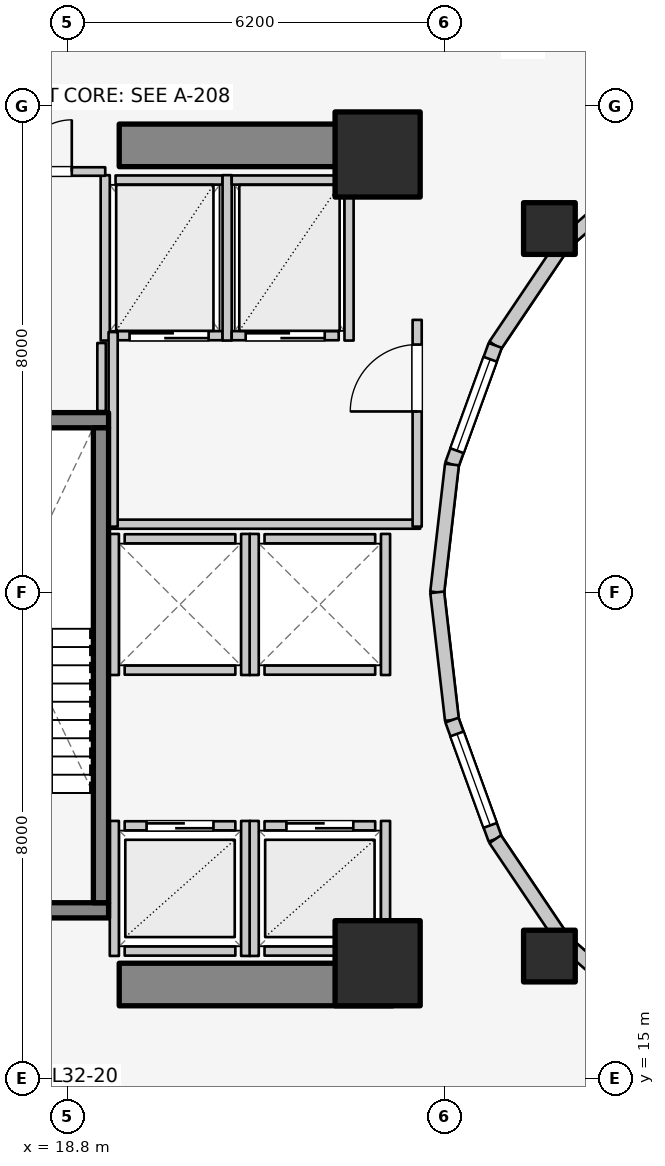
"""IFC4 building model, lengths in metres.
Left out: names, types, materials, properties, quantities, classifications, styles, units other than length and angle.
Written with IfcOpenShell. Run it as: python <this file> out.ifc"""

import sys

from ifc_helpers import new_model, si_unit, direction, frame, frame_2d, origin, origin_2d, place, context, subcontext, project, spatial, rectangle, extrude, element, fill, save


model = new_model("IFC4")
c1 = context("Model", 3, precision=1e-05, world=origin(), true_north=direction((0.0, 1.0)))
c2 = subcontext(c1, "Body", "Model", "MODEL_VIEW")
j1 = project(units=[si_unit("LENGTHUNIT", "METRE"), si_unit("PLANEANGLEUNIT", "RADIAN")], contexts=[c1])
p1 = place(None, origin())
s1 = spatial("IfcSite", under=j1, at=p1, CompositionType="ELEMENT")
p2 = place(p1, origin())
s2 = spatial("IfcBuilding", under=s1, at=p2, CompositionType="ELEMENT")
p3 = place(p2, frame((0.0, 0.0, 107.3)))
s3 = spatial("IfcBuildingStorey", under=s2, at=p3, CompositionType="ELEMENT", Elevation=107.3)
for number, where, z_axis, x_axis in (
    (1, (19.65, 16.55, 0.0), (0.0, 0.0, 1.0), (1.0, 0.0, 0.0)),
    (2, (19.65, 30.35, 0.0), (0.0, 0.0, 1.0), (1.0, 0.0, 0.0)),
):
    element("IfcWall", number, at=place(p3, frame(where, z_axis=z_axis, x_axis=x_axis)), inside=s3, PredefinedType="SHEAR", context=c2, shape_type="SweptSolid", body=[
        extrude(rectangle(XDim=4.5, YDim=0.7, at=frame_2d((2.25, 0.0))), origin(), (0.0, 0.0, 1.0), 3.1),
    ])
p4 = place(p3, frame((16.105, 17.77, 0.0), z_axis=(0.0, 0.0, 1.0), x_axis=(1.0, 0.0, 0.0)))
e3 = element("IfcWall", 3, at=p4, inside=s3, PredefinedType="SOLIDWALL", context=c2, shape_type="SweptSolid", body=[
    extrude(rectangle(XDim=3.37, YDim=0.25, at=frame_2d((1.685, 0.0))), origin(), (0.0, 0.0, 1.0), 3.1),
])
p5 = place(p4, frame((1.135, 0.0, 0.0)))
e4 = element("IfcOpeningElement", 4, at=p5, cuts=e3, PredefinedType="OPENING", context=c2, shape_type="SweptSolid", body=[
    extrude(rectangle(XDim=1.1, YDim=2.1, at=frame_2d((0.55, 1.05))), frame((0.0, 0.135, 0.0), z_axis=(0.0, -1.0, 0.0), x_axis=(1.0, 0.0, 0.0)), (0.0, 0.0, 1.0), 0.27),
])
p6 = place(p3, frame((16.105, 25.83, 0.0), z_axis=(0.0, 0.0, 1.0), x_axis=(1.0, 0.0, 0.0)))
e5 = element("IfcWall", 5, at=p6, inside=s3, PredefinedType="SOLIDWALL", context=c2, shape_type="SweptSolid", body=[
    extrude(rectangle(XDim=3.37, YDim=0.25, at=frame_2d((1.685, 0.0))), origin(), (0.0, 0.0, 1.0), 3.1),
])
p7 = place(p3, frame((19.35, 17.895, 0.0), z_axis=(0.0, 0.0, 1.0), x_axis=(0.0, 1.0, 0.0)))
e6 = element("IfcWall", 6, at=p7, inside=s3, PredefinedType="SOLIDWALL", context=c2, shape_type="SweptSolid", body=[
    extrude(rectangle(XDim=7.81, YDim=0.25, at=frame_2d((3.905, 0.0))), origin(), (0.0, 0.0, 1.0), 3.1),
])
for number, where, z_axis, x_axis in (
    (7, (23.9, 16.9, 0.0), (0.0, 0.0, 1.0), (1.0, 0.0, 0.0)),
    (8, (23.9, 30.2, 0.0), (0.0, 0.0, 1.0), (1.0, 0.0, 0.0)),
):
    element("IfcColumn", number, at=place(p3, frame(where, z_axis=z_axis, x_axis=x_axis)), inside=s3, PredefinedType="COLUMN", context=c2, shape_type="SweptSolid", body=[
        extrude(rectangle(XDim=1.4, YDim=1.4, at=origin_2d()), origin(), (0.0, 0.0, 1.0), 3.1),
    ])
for number, where, z_axis, x_axis in (
    (9, (26.725, 28.982, 0.0), (0.0, 0.0, 1.0), (1.0, 0.0, 0.0)),
    (10, (26.725, 17.018, 0.0), (0.0, 0.0, 1.0), (1.0, 0.0, 0.0)),
):
    element("IfcColumn", number, at=place(p3, frame(where, z_axis=z_axis, x_axis=x_axis)), inside=s3, PredefinedType="COLUMN", context=c2, shape_type="SweptSolid", body=[
        extrude(rectangle(XDim=0.85, YDim=0.85, at=origin_2d()), origin(), (0.0, 0.0, 1.0), 3.1),
    ])
p8 = place(p3, frame((28.44, 30.032, 0.0), z_axis=(0.0, 0.0, 1.0), x_axis=(-0.752576694707, -0.658504607869, 0.0)))
e11 = element("IfcWall", 11, at=p8, inside=s3, PredefinedType="STANDARD", context=c2, shape_type="SweptSolid", body=[
    extrude(rectangle(XDim=1.959, YDim=0.23, at=frame_2d((0.98, 0.0))), origin(), (0.0, 0.0, 1.0), 2.16),
])
p9 = place(p3, frame((26.965, 28.742, 0.0), z_axis=(0.0, 0.0, 1.0), x_axis=(-0.558197800898, -0.829707909492, 0.0)))
e12 = element("IfcWall", 12, at=p9, inside=s3, PredefinedType="STANDARD", context=c2, shape_type="SweptSolid", body=[
    extrude(rectangle(XDim=2.027, YDim=0.23, at=frame_2d((1.013, 0.0))), origin(), (0.0, 0.0, 1.0), 2.16),
])
p10 = place(p3, frame((25.834, 27.06, 0.0), z_axis=(0.0, 0.0, 1.0), x_axis=(-0.341423187295, -0.93990968033, 0.0)))
e13 = element("IfcWall", 13, at=p10, inside=s3, PredefinedType="STANDARD", context=c2, shape_type="SweptSolid", body=[
    extrude(rectangle(XDim=2.084, YDim=0.23, at=frame_2d((1.042, 0.0))), origin(), (0.0, 0.0, 1.0), 2.84),
])
p11 = place(p10, frame((0.242, 0.0, 0.85)))
e14 = element("IfcOpeningElement", 14, at=p11, cuts=e13, PredefinedType="OPENING", context=c2, shape_type="SweptSolid", body=[
    extrude(rectangle(XDim=1.6, YDim=1.65, at=frame_2d((0.8, 0.825))), frame((0.0, 0.125, 0.0), z_axis=(0.0, -1.0, 0.0), x_axis=(1.0, 0.0, 0.0)), (0.0, 0.0, 1.0), 0.25),
])
for number, where, z_axis, x_axis in (
    (15, (25.123, 25.102, 0.0), (0.0, 0.0, 1.0), (-0.115, -0.993, 0.0)),
    (16, (24.88, 23.0, 0.0), (0.0, 0.0, 1.0), (0.115, -0.993, 0.0)),
):
    element("IfcWall", number, at=place(p3, frame(where, z_axis=z_axis, x_axis=x_axis)), inside=s3, PredefinedType="STANDARD", context=c2, shape_type="SweptSolid", body=[
        extrude(rectangle(XDim=2.115, YDim=0.23, at=frame_2d((1.058, 0.0))), origin(), (0.0, 0.0, 1.0), 2.84),
    ])
p12 = place(p3, frame((25.123, 20.898, 0.0), z_axis=(0.0, 0.0, 1.0), x_axis=(0.341423187295, -0.93990968033, 0.0)))
e17 = element("IfcWall", 17, at=p12, inside=s3, PredefinedType="STANDARD", context=c2, shape_type="SweptSolid", body=[
    extrude(rectangle(XDim=2.084, YDim=0.23, at=frame_2d((1.042, 0.0))), origin(), (0.0, 0.0, 1.0), 2.84),
])
p13 = place(p12, frame((0.242, 0.0, 0.85)))
e18 = element("IfcOpeningElement", 18, at=p13, cuts=e17, PredefinedType="OPENING", context=c2, shape_type="SweptSolid", body=[
    extrude(rectangle(XDim=1.6, YDim=1.65, at=frame_2d((0.8, 0.825))), frame((0.0, 0.125, 0.0), z_axis=(0.0, -1.0, 0.0), x_axis=(1.0, 0.0, 0.0)), (0.0, 0.0, 1.0), 0.25),
])
p14 = place(p3, frame((25.834, 18.94, 0.0), z_axis=(0.0, 0.0, 1.0), x_axis=(0.558197800898, -0.829707909492, 0.0)))
e19 = element("IfcWall", 19, at=p14, inside=s3, PredefinedType="STANDARD", context=c2, shape_type="SweptSolid", body=[
    extrude(rectangle(XDim=2.027, YDim=0.23, at=frame_2d((1.013, 0.0))), origin(), (0.0, 0.0, 1.0), 2.16),
])
p15 = place(p3, frame((26.965, 17.258, 0.0), z_axis=(0.0, 0.0, 1.0), x_axis=(0.752576694707, -0.658504607869, 0.0)))
e20 = element("IfcWall", 20, at=p15, inside=s3, PredefinedType="STANDARD", context=c2, shape_type="SweptSolid", body=[
    extrude(rectangle(XDim=1.959, YDim=0.23, at=frame_2d((0.98, 0.0))), origin(), (0.0, 0.0, 1.0), 2.16),
])
p16 = place(p3, frame((19.74, 19.16, 0.0), z_axis=(0.0, 0.0, 1.0), x_axis=(1.0, 0.0, 0.0)))
e21 = element("IfcWall", 21, at=p16, inside=s3, PredefinedType="SOLIDWALL", context=c2, shape_type="SweptSolid", body=[
    extrude(rectangle(XDim=1.82, YDim=0.15, at=frame_2d((0.91, 0.0))), origin(), (0.0, 0.0, 1.0), 2.855),
])
p17 = place(p16, frame((0.36, 0.0, 0.0)))
e22 = element("IfcOpeningElement", 22, at=p17, cuts=e21, PredefinedType="OPENING", context=c2, shape_type="SweptSolid", body=[
    extrude(rectangle(XDim=1.1, YDim=2.1, at=frame_2d((0.55, 1.05))), frame((0.0, 0.085, 0.0), z_axis=(0.0, -1.0, 0.0), x_axis=(1.0, 0.0, 0.0)), (0.0, 0.0, 1.0), 0.17),
])
p18 = place(p3, frame((19.74, 17.1, 0.0), z_axis=(0.0, 0.0, 1.0), x_axis=(1.0, 0.0, 0.0)))
e23 = element("IfcWall", 23, at=p18, inside=s3, PredefinedType="SOLIDWALL", context=c2, shape_type="SweptSolid", body=[
    extrude(rectangle(XDim=1.82, YDim=0.15, at=frame_2d((0.91, 0.0))), origin(), (0.0, 0.0, 1.0), 2.855),
])
p19 = place(p3, frame((19.57, 17.02, 0.0), z_axis=(0.0, 0.0, 1.0), x_axis=(0.0, 1.0, 0.0)))
e24 = element("IfcWall", 24, at=p19, inside=s3, PredefinedType="SOLIDWALL", context=c2, shape_type="SweptSolid", body=[
    extrude(rectangle(XDim=2.22, YDim=0.15, at=frame_2d((1.11, 0.0))), origin(), (0.0, 0.0, 1.0), 2.12),
])
p20 = place(p3, frame((21.73, 17.02, 0.0), z_axis=(0.0, 0.0, 1.0), x_axis=(0.0, 1.0, 0.0)))
e25 = element("IfcWall", 25, at=p20, inside=s3, PredefinedType="SOLIDWALL", context=c2, shape_type="SweptSolid", body=[
    extrude(rectangle(XDim=2.22, YDim=0.15, at=frame_2d((1.11, 0.0))), origin(), (0.0, 0.0, 1.0), 2.855),
])
p21 = place(p3, frame((22.04, 19.16, 0.0), z_axis=(0.0, 0.0, 1.0), x_axis=(1.0, 0.0, 0.0)))
e26 = element("IfcWall", 26, at=p21, inside=s3, PredefinedType="SOLIDWALL", context=c2, shape_type="SweptSolid", body=[
    extrude(rectangle(XDim=1.82, YDim=0.15, at=frame_2d((0.91, 0.0))), origin(), (0.0, 0.0, 1.0), 2.12),
])
p22 = place(p21, frame((0.36, 0.0, 0.0)))
e27 = element("IfcOpeningElement", 27, at=p22, cuts=e26, PredefinedType="OPENING", context=c2, shape_type="SweptSolid", body=[
    extrude(rectangle(XDim=1.1, YDim=2.1, at=frame_2d((0.55, 1.05))), frame((0.0, 0.085, 0.0), z_axis=(0.0, -1.0, 0.0), x_axis=(1.0, 0.0, 0.0)), (0.0, 0.0, 1.0), 0.17),
])
p23 = place(p3, frame((22.04, 17.1, 0.0), z_axis=(0.0, 0.0, 1.0), x_axis=(1.0, 0.0, 0.0)))
e28 = element("IfcWall", 28, at=p23, inside=s3, PredefinedType="SOLIDWALL", context=c2, shape_type="SweptSolid", body=[
    extrude(rectangle(XDim=1.82, YDim=0.15, at=frame_2d((0.91, 0.0))), origin(), (0.0, 0.0, 1.0), 2.12),
])
p24 = place(p3, frame((21.87, 17.02, 0.0), z_axis=(0.0, 0.0, 1.0), x_axis=(0.0, 1.0, 0.0)))
e29 = element("IfcWall", 29, at=p24, inside=s3, PredefinedType="SOLIDWALL", context=c2, shape_type="SweptSolid", body=[
    extrude(rectangle(XDim=2.22, YDim=0.15, at=frame_2d((1.11, 0.0))), origin(), (0.0, 0.0, 1.0), 2.855),
])
p25 = place(p3, frame((24.03, 17.02, 0.0), z_axis=(0.0, 0.0, 1.0), x_axis=(0.0, 1.0, 0.0)))
e30 = element("IfcWall", 30, at=p25, inside=s3, PredefinedType="SOLIDWALL", context=c2, shape_type="SweptSolid", body=[
    extrude(rectangle(XDim=2.22, YDim=0.15, at=frame_2d((1.11, 0.0))), origin(), (0.0, 0.0, 1.0), 2.12),
])
for number, where, z_axis, x_axis in (
    (31, (19.74, 21.72, 0.0), (0.0, 0.0, 1.0), (1.0, 0.0, 0.0)),
    (32, (19.74, 23.88, 0.0), (0.0, 0.0, 1.0), (1.0, 0.0, 0.0)),
):
    element("IfcWall", number, at=place(p3, frame(where, z_axis=z_axis, x_axis=x_axis)), inside=s3, PredefinedType="SOLIDWALL", context=c2, shape_type="SweptSolid", body=[
        extrude(rectangle(XDim=1.82, YDim=0.15, at=frame_2d((0.91, 0.0))), origin(), (0.0, 0.0, 1.0), 2.855),
    ])
for number, where, z_axis, x_axis in (
    (33, (19.57, 21.64, 0.0), (0.0, 0.0, 1.0), (0.0, 1.0, 0.0)),
    (34, (21.73, 21.64, 0.0), (0.0, 0.0, 1.0), (0.0, 1.0, 0.0)),
):
    element("IfcWall", number, at=place(p3, frame(where, z_axis=z_axis, x_axis=x_axis)), inside=s3, PredefinedType="SOLIDWALL", context=c2, shape_type="SweptSolid", body=[
        extrude(rectangle(XDim=2.32, YDim=0.15, at=frame_2d((1.16, 0.0))), origin(), (0.0, 0.0, 1.0), 2.855),
    ])
for number, where, z_axis, x_axis in (
    (35, (22.04, 21.72, 0.0), (0.0, 0.0, 1.0), (1.0, 0.0, 0.0)),
    (36, (22.04, 23.88, 0.0), (0.0, 0.0, 1.0), (1.0, 0.0, 0.0)),
):
    element("IfcWall", number, at=place(p3, frame(where, z_axis=z_axis, x_axis=x_axis)), inside=s3, PredefinedType="SOLIDWALL", context=c2, shape_type="SweptSolid", body=[
        extrude(rectangle(XDim=1.82, YDim=0.15, at=frame_2d((0.91, 0.0))), origin(), (0.0, 0.0, 1.0), 2.12),
    ])
p26 = place(p3, frame((21.87, 21.64, 0.0), z_axis=(0.0, 0.0, 1.0), x_axis=(0.0, 1.0, 0.0)))
e37 = element("IfcWall", 37, at=p26, inside=s3, PredefinedType="SOLIDWALL", context=c2, shape_type="SweptSolid", body=[
    extrude(rectangle(XDim=2.32, YDim=0.15, at=frame_2d((1.16, 0.0))), origin(), (0.0, 0.0, 1.0), 2.855),
])
p27 = place(p3, frame((24.03, 21.64, 0.0), z_axis=(0.0, 0.0, 1.0), x_axis=(0.0, 1.0, 0.0)))
e38 = element("IfcWall", 38, at=p27, inside=s3, PredefinedType="SOLIDWALL", context=c2, shape_type="SweptSolid", body=[
    extrude(rectangle(XDim=2.32, YDim=0.15, at=frame_2d((1.16, 0.0))), origin(), (0.0, 0.0, 1.0), 2.12),
])
p28 = place(p3, frame((19.59, 27.22, 0.0), z_axis=(0.0, 0.0, 1.0), x_axis=(1.0, 0.0, 0.0)))
e39 = element("IfcWall", 39, at=p28, inside=s3, PredefinedType="SOLIDWALL", context=c2, shape_type="SweptSolid", body=[
    extrude(rectangle(XDim=1.76, YDim=0.15, at=frame_2d((0.88, 0.0))), origin(), (0.0, 0.0, 1.0), 2.855),
])
p29 = place(p28, frame((0.23, 0.0, 0.0)))
e40 = element("IfcOpeningElement", 40, at=p29, cuts=e39, PredefinedType="OPENING", context=c2, shape_type="SweptSolid", body=[
    extrude(rectangle(XDim=1.3, YDim=2.1, at=frame_2d((0.65, 1.05))), frame((0.0, 0.085, 0.0), z_axis=(0.0, -1.0, 0.0), x_axis=(1.0, 0.0, 0.0)), (0.0, 0.0, 1.0), 0.17),
])
p30 = place(p3, frame((19.59, 29.78, 0.0), z_axis=(0.0, 0.0, 1.0), x_axis=(1.0, 0.0, 0.0)))
e41 = element("IfcWall", 41, at=p30, inside=s3, PredefinedType="SOLIDWALL", context=c2, shape_type="SweptSolid", body=[
    extrude(rectangle(XDim=1.76, YDim=0.15, at=frame_2d((0.88, 0.0))), origin(), (0.0, 0.0, 1.0), 2.855),
])
for number, where, z_axis, x_axis in (
    (42, (19.42, 27.14, 0.0), (0.0, 0.0, 1.0), (0.0, 1.0, 0.0)),
    (43, (21.425, 27.14, 0.0), (0.0, 0.0, 1.0), (0.0, 1.0, 0.0)),
):
    element("IfcWall", number, at=place(p3, frame(where, z_axis=z_axis, x_axis=x_axis)), inside=s3, PredefinedType="SOLIDWALL", context=c2, shape_type="SweptSolid", body=[
        extrude(rectangle(XDim=2.72, YDim=0.15, at=frame_2d((1.36, 0.0))), origin(), (0.0, 0.0, 1.0), 2.855),
    ])
p31 = place(p3, frame((21.5, 27.22, 0.0), z_axis=(0.0, 0.0, 1.0), x_axis=(1.0, 0.0, 0.0)))
e44 = element("IfcWall", 44, at=p31, inside=s3, PredefinedType="SOLIDWALL", context=c2, shape_type="SweptSolid", body=[
    extrude(rectangle(XDim=1.76, YDim=0.15, at=frame_2d((0.88, 0.0))), origin(), (0.0, 0.0, 1.0), 2.855),
])
p32 = place(p31, frame((0.23, 0.0, 0.0)))
e45 = element("IfcOpeningElement", 45, at=p32, cuts=e44, PredefinedType="OPENING", context=c2, shape_type="SweptSolid", body=[
    extrude(rectangle(XDim=1.3, YDim=2.1, at=frame_2d((0.65, 1.05))), frame((0.0, 0.085, 0.0), z_axis=(0.0, -1.0, 0.0), x_axis=(1.0, 0.0, 0.0)), (0.0, 0.0, 1.0), 0.17),
])
p33 = place(p3, frame((21.5, 29.78, 0.0), z_axis=(0.0, 0.0, 1.0), x_axis=(1.0, 0.0, 0.0)))
e46 = element("IfcWall", 46, at=p33, inside=s3, PredefinedType="SOLIDWALL", context=c2, shape_type="SweptSolid", body=[
    extrude(rectangle(XDim=1.76, YDim=0.15, at=frame_2d((0.88, 0.0))), origin(), (0.0, 0.0, 1.0), 2.855),
])
p34 = place(p3, frame((23.43, 27.14, 0.0), z_axis=(0.0, 0.0, 1.0), x_axis=(0.0, 1.0, 0.0)))
e47 = element("IfcWall", 47, at=p34, inside=s3, PredefinedType="SOLIDWALL", context=c2, shape_type="SweptSolid", body=[
    extrude(rectangle(XDim=2.72, YDim=0.15, at=frame_2d((1.36, 0.0))), origin(), (0.0, 0.0, 1.0), 2.855),
])
p35 = place(p3, frame((19.52, 24.12, 0.0), z_axis=(0.0, 0.0, 1.0), x_axis=(1.0, 0.0, 0.0)))
e48 = element("IfcWall", 48, at=p35, inside=s3, PredefinedType="PARTITIONING", context=c2, shape_type="SweptSolid", body=[
    extrude(rectangle(XDim=5.08, YDim=0.15, at=frame_2d((2.54, 0.0))), origin(), (0.0, 0.0, 1.0), 2.12),
])
p36 = place(p3, frame((19.55, 24.08, 0.0), z_axis=(0.0, 0.0, 1.0), x_axis=(0.0, 1.0, 0.0)))
e49 = element("IfcWall", 49, at=p36, inside=s3, PredefinedType="PARTITIONING", context=c2, shape_type="SweptSolid", body=[
    extrude(rectangle(XDim=3.2, YDim=0.15, at=frame_2d((1.6, 0.0))), origin(), (0.0, 0.0, 1.0), 2.855),
])
p37 = place(p3, frame((24.55, 24.08, 0.0), z_axis=(0.0, 0.0, 1.0), x_axis=(0.0, 1.0, 0.0)))
e50 = element("IfcWall", 50, at=p37, inside=s3, PredefinedType="PARTITIONING", context=c2, shape_type="SweptSolid", body=[
    extrude(rectangle(XDim=3.4, YDim=0.15, at=frame_2d((1.7, 0.0))), origin(), (0.0, 0.0, 1.0), 2.855),
])
p38 = place(p37, frame((1.894, 0.0, 0.0)))
e51 = element("IfcOpeningElement", 51, at=p38, cuts=e50, PredefinedType="OPENING", context=c2, shape_type="SweptSolid", body=[
    extrude(rectangle(XDim=1.1, YDim=2.1, at=frame_2d((0.55, 1.05))), frame((0.0, 0.085, 0.0), z_axis=(0.0, -1.0, 0.0), x_axis=(1.0, 0.0, 0.0)), (0.0, 0.0, 1.0), 0.17),
])
p39 = place(p3, frame((17.52, 29.92, 0.0), z_axis=(0.0, 0.0, 1.0), x_axis=(1.0, 0.0, 0.0)))
e52 = element("IfcWall", 52, at=p39, inside=s3, PredefinedType="PLUMBINGWALL", context=c2, shape_type="SweptSolid", body=[
    extrude(rectangle(XDim=1.9, YDim=0.14, at=frame_2d((0.95, 0.0))), origin(), (0.0, 0.0, 1.0), 2.855),
])
p40 = place(p39, frame((0.5, 0.0, 0.0)))
e53 = element("IfcOpeningElement", 53, at=p40, cuts=e52, PredefinedType="OPENING", context=c2, shape_type="SweptSolid", body=[
    extrude(rectangle(XDim=0.85, YDim=2.05, at=frame_2d((0.425, 1.025))), frame((0.0, 0.08, 0.0), z_axis=(0.0, -1.0, 0.0), x_axis=(1.0, 0.0, 0.0)), (0.0, 0.0, 1.0), 0.16),
])
p41 = place(p3, frame((19.36, 25.98, 0.0), z_axis=(0.0, 0.0, 1.0), x_axis=(0.0, 1.0, 0.0)))
e54 = element("IfcWall", 54, at=p41, inside=s3, PredefinedType="PLUMBINGWALL", context=c2, shape_type="SweptSolid", body=[
    extrude(rectangle(XDim=1.12, YDim=0.14, at=frame_2d((0.56, 0.0))), origin(), (0.0, 0.0, 1.0), 2.855),
])
p42 = place(p11, origin())
e55 = element("IfcWindow", 55, at=p42, inside=s3, PartitioningType="SINGLE_PANEL", PredefinedType="WINDOW", context=c2, shape_type="SweptSolid", body=[
    extrude(rectangle(XDim=1.6, YDim=1.65, at=frame_2d((0.8, 0.825))), frame((0.0, 0.03, 0.0), z_axis=(0.0, -1.0, 0.0), x_axis=(1.0, 0.0, 0.0)), (0.0, 0.0, 1.0), 0.06),
])
fill(e14, e55)
p43 = place(p13, origin())
e56 = element("IfcWindow", 56, at=p43, inside=s3, PartitioningType="SINGLE_PANEL", PredefinedType="WINDOW", context=c2, shape_type="SweptSolid", body=[
    extrude(rectangle(XDim=1.6, YDim=1.65, at=frame_2d((0.8, 0.825))), frame((0.0, 0.03, 0.0), z_axis=(0.0, -1.0, 0.0), x_axis=(1.0, 0.0, 0.0)), (0.0, 0.0, 1.0), 0.06),
])
fill(e18, e56)
p44 = place(p17, origin())
e57 = element("IfcDoor", 57, at=p44, inside=s3, OperationType="DOUBLE_DOOR_SLIDING", PredefinedType="DOOR", context=c2, shape_type="SweptSolid", body=[
    extrude(rectangle(XDim=1.1, YDim=2.1, at=frame_2d((0.55, 1.05))), frame((0.0, 0.025, 0.0), z_axis=(0.0, -1.0, 0.0), x_axis=(1.0, 0.0, 0.0)), (0.0, 0.0, 1.0), 0.05),
])
fill(e22, e57)
p45 = place(p22, origin())
e58 = element("IfcDoor", 58, at=p45, inside=s3, OperationType="DOUBLE_DOOR_SLIDING", PredefinedType="DOOR", context=c2, shape_type="SweptSolid", body=[
    extrude(rectangle(XDim=1.1, YDim=2.1, at=frame_2d((0.55, 1.05))), frame((0.0, 0.025, 0.0), z_axis=(0.0, -1.0, 0.0), x_axis=(1.0, 0.0, 0.0)), (0.0, 0.0, 1.0), 0.05),
])
fill(e27, e58)
p46 = place(p29, origin())
e59 = element("IfcDoor", 59, at=p46, inside=s3, OperationType="DOUBLE_DOOR_SLIDING", PredefinedType="DOOR", context=c2, shape_type="SweptSolid", body=[
    extrude(rectangle(XDim=1.3, YDim=2.1, at=frame_2d((0.65, 1.05))), frame((0.0, 0.025, 0.0), z_axis=(0.0, -1.0, 0.0), x_axis=(1.0, 0.0, 0.0)), (0.0, 0.0, 1.0), 0.05),
])
fill(e40, e59)
p47 = place(p32, origin())
e60 = element("IfcDoor", 60, at=p47, inside=s3, OperationType="DOUBLE_DOOR_SLIDING", PredefinedType="DOOR", context=c2, shape_type="SweptSolid", body=[
    extrude(rectangle(XDim=1.3, YDim=2.1, at=frame_2d((0.65, 1.05))), frame((0.0, 0.025, 0.0), z_axis=(0.0, -1.0, 0.0), x_axis=(1.0, 0.0, 0.0)), (0.0, 0.0, 1.0), 0.05),
])
fill(e45, e60)
p48 = place(p38, origin())
e61 = element("IfcDoor", 61, at=p48, inside=s3, OperationType="SINGLE_SWING_LEFT", PredefinedType="DOOR", context=c2, shape_type="SweptSolid", body=[
    extrude(rectangle(XDim=1.1, YDim=2.1, at=frame_2d((0.55, 1.05))), frame((0.0, 0.025, 0.0), z_axis=(0.0, -1.0, 0.0), x_axis=(1.0, 0.0, 0.0)), (0.0, 0.0, 1.0), 0.05),
])
fill(e51, e61)
p49 = place(p40, origin())
e62 = element("IfcDoor", 62, at=p49, inside=s3, OperationType="SINGLE_SWING_RIGHT", PredefinedType="DOOR", context=c2, shape_type="SweptSolid", body=[
    extrude(rectangle(XDim=0.85, YDim=2.05, at=frame_2d((0.425, 1.025))), frame((0.0, 0.025, 0.0), z_axis=(0.0, -1.0, 0.0), x_axis=(1.0, 0.0, 0.0)), (0.0, 0.0, 1.0), 0.05),
])
fill(e53, e62)
save(model, sys.argv[1])
